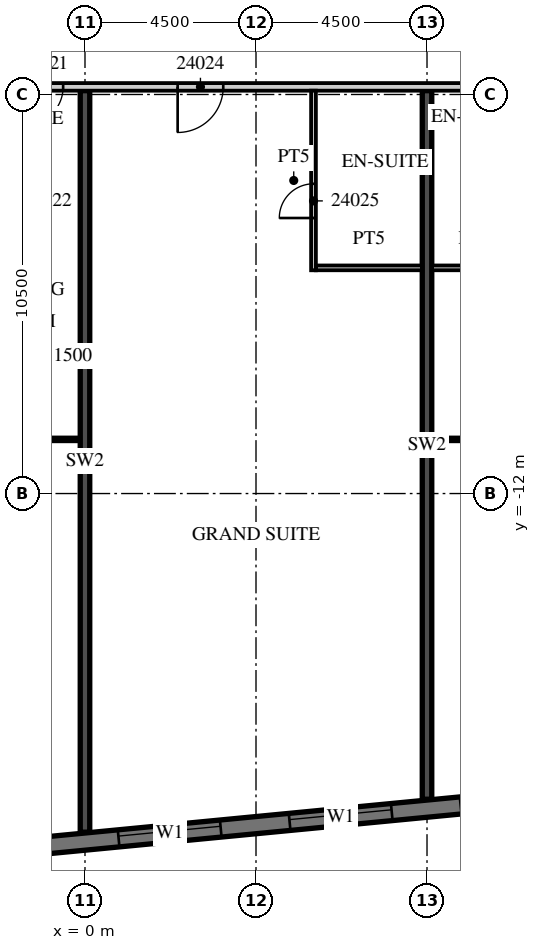
"""IFC4 building model, lengths in metres.
Left out: names, types, materials, properties, quantities, classifications, styles, units other than length and angle.
Written with IfcOpenShell. Run it as: python <this file> out.ifc"""

import sys

from ifc_helpers import new_model, si_unit, direction, frame, frame_2d, origin, place, context, subcontext, project, spatial, rectangle, extrude, element, fill, save


model = new_model("IFC4")
c1 = context("Model", 3, precision=1e-05, world=origin(), true_north=direction((0.0, 1.0)))
c2 = subcontext(c1, "Body", "Model", "MODEL_VIEW")
j1 = project(units=[si_unit("LENGTHUNIT", "METRE"), si_unit("PLANEANGLEUNIT", "RADIAN")], contexts=[c1])
p1 = place(None, origin())
s1 = spatial("IfcSite", under=j1, at=p1, CompositionType="ELEMENT")
p2 = place(p1, origin())
s2 = spatial("IfcBuilding", under=s1, at=p2, CompositionType="ELEMENT")
p3 = place(p2, frame((0.0, 0.0, 114.1)))
s3 = spatial("IfcBuildingStorey", under=s2, at=p3, CompositionType="ELEMENT", Elevation=114.1)
p4 = place(p3, frame((0.0, -20.91, 0.0), z_axis=(0.0, 0.0, 1.0), x_axis=(0.0, 1.0, 0.0)))
e1 = element("IfcWall", 1, at=p4, inside=s3, PredefinedType="SHEAR", context=c2, shape_type="SweptSolid", body=[
    extrude(rectangle(XDim=19.51, YDim=0.25, at=frame_2d((9.755, 0.0))), origin(), (0.0, 0.0, 1.0), 3.3),
])
p5 = place(p3, frame((9.0, -20.044, 0.0), z_axis=(0.0, 0.0, 1.0), x_axis=(0.0, 1.0, 0.0)))
e2 = element("IfcWall", 2, at=p5, inside=s3, PredefinedType="SHEAR", context=c2, shape_type="SweptSolid", body=[
    extrude(rectangle(XDim=18.644, YDim=0.25, at=frame_2d((9.322, 0.0))), origin(), (0.0, 0.0, 1.0), 3.3),
])
p6 = place(p3, frame((-13.521, -22.46, 0.0), z_axis=(0.0, 0.0, 1.0), x_axis=(0.995396096335, 0.095846812164, 0.0)))
e3 = element("IfcWall", 3, at=p6, inside=s3, PredefinedType="SOLIDWALL", context=c2, shape_type="SweptSolid", body=[
    extrude(rectangle(XDim=59.151, YDim=0.45, at=frame_2d((29.575, 0.0))), origin(), (0.0, 0.0, 1.0), 3.02),
])
p7 = place(p6, frame((0.91, 0.0, 0.45)))
e4 = element("IfcOpeningElement", 4, at=p7, cuts=e3, PredefinedType="OPENING", context=c2, shape_type="SweptSolid", body=[
    extrude(rectangle(XDim=2.7, YDim=2.25, at=frame_2d((1.35, 1.125))), frame((0.0, 0.235, 0.0), z_axis=(0.0, -1.0, 0.0), x_axis=(1.0, 0.0, 0.0)), (0.0, 0.0, 1.0), 0.47),
])
p8 = place(p6, frame((5.431, 0.0, 0.45)))
e5 = element("IfcOpeningElement", 5, at=p8, cuts=e3, PredefinedType="OPENING", context=c2, shape_type="SweptSolid", body=[
    extrude(rectangle(XDim=2.7, YDim=2.25, at=frame_2d((1.35, 1.125))), frame((0.0, 0.235, 0.0), z_axis=(0.0, -1.0, 0.0), x_axis=(1.0, 0.0, 0.0)), (0.0, 0.0, 1.0), 0.47),
])
p9 = place(p6, frame((9.952, 0.0, 0.45)))
e6 = element("IfcOpeningElement", 6, at=p9, cuts=e3, PredefinedType="OPENING", context=c2, shape_type="SweptSolid", body=[
    extrude(rectangle(XDim=2.7, YDim=2.25, at=frame_2d((1.35, 1.125))), frame((0.0, 0.235, 0.0), z_axis=(0.0, -1.0, 0.0), x_axis=(1.0, 0.0, 0.0)), (0.0, 0.0, 1.0), 0.47),
])
p10 = place(p6, frame((14.473, 0.0, 0.45)))
e7 = element("IfcOpeningElement", 7, at=p10, cuts=e3, PredefinedType="OPENING", context=c2, shape_type="SweptSolid", body=[
    extrude(rectangle(XDim=2.7, YDim=2.25, at=frame_2d((1.35, 1.125))), frame((0.0, 0.235, 0.0), z_axis=(0.0, -1.0, 0.0), x_axis=(1.0, 0.0, 0.0)), (0.0, 0.0, 1.0), 0.47),
])
p11 = place(p6, frame((18.994, 0.0, 0.45)))
e8 = element("IfcOpeningElement", 8, at=p11, cuts=e3, PredefinedType="OPENING", context=c2, shape_type="SweptSolid", body=[
    extrude(rectangle(XDim=2.7, YDim=2.25, at=frame_2d((1.35, 1.125))), frame((0.0, 0.235, 0.0), z_axis=(0.0, -1.0, 0.0), x_axis=(1.0, 0.0, 0.0)), (0.0, 0.0, 1.0), 0.47),
])
p12 = place(p6, frame((23.514, 0.0, 0.45)))
e9 = element("IfcOpeningElement", 9, at=p12, cuts=e3, PredefinedType="OPENING", context=c2, shape_type="SweptSolid", body=[
    extrude(rectangle(XDim=2.7, YDim=2.25, at=frame_2d((1.35, 1.125))), frame((0.0, 0.235, 0.0), z_axis=(0.0, -1.0, 0.0), x_axis=(1.0, 0.0, 0.0)), (0.0, 0.0, 1.0), 0.47),
])
p13 = place(p6, frame((28.035, 0.0, 0.45)))
e10 = element("IfcOpeningElement", 10, at=p13, cuts=e3, PredefinedType="OPENING", context=c2, shape_type="SweptSolid", body=[
    extrude(rectangle(XDim=2.7, YDim=2.25, at=frame_2d((1.35, 1.125))), frame((0.0, 0.235, 0.0), z_axis=(0.0, -1.0, 0.0), x_axis=(1.0, 0.0, 0.0)), (0.0, 0.0, 1.0), 0.47),
])
p14 = place(p6, frame((32.556, 0.0, 0.45)))
e11 = element("IfcOpeningElement", 11, at=p14, cuts=e3, PredefinedType="OPENING", context=c2, shape_type="SweptSolid", body=[
    extrude(rectangle(XDim=2.7, YDim=2.25, at=frame_2d((1.35, 1.125))), frame((0.0, 0.235, 0.0), z_axis=(0.0, -1.0, 0.0), x_axis=(1.0, 0.0, 0.0)), (0.0, 0.0, 1.0), 0.47),
])
p15 = place(p6, frame((37.077, 0.0, 0.45)))
e12 = element("IfcOpeningElement", 12, at=p15, cuts=e3, PredefinedType="OPENING", context=c2, shape_type="SweptSolid", body=[
    extrude(rectangle(XDim=2.7, YDim=2.25, at=frame_2d((1.35, 1.125))), frame((0.0, 0.235, 0.0), z_axis=(0.0, -1.0, 0.0), x_axis=(1.0, 0.0, 0.0)), (0.0, 0.0, 1.0), 0.47),
])
p16 = place(p6, frame((41.598, 0.0, 0.45)))
e13 = element("IfcOpeningElement", 13, at=p16, cuts=e3, PredefinedType="OPENING", context=c2, shape_type="SweptSolid", body=[
    extrude(rectangle(XDim=2.7, YDim=2.25, at=frame_2d((1.35, 1.125))), frame((0.0, 0.235, 0.0), z_axis=(0.0, -1.0, 0.0), x_axis=(1.0, 0.0, 0.0)), (0.0, 0.0, 1.0), 0.47),
])
p17 = place(p6, frame((46.118, 0.0, 0.45)))
e14 = element("IfcOpeningElement", 14, at=p17, cuts=e3, PredefinedType="OPENING", context=c2, shape_type="SweptSolid", body=[
    extrude(rectangle(XDim=2.7, YDim=2.25, at=frame_2d((1.35, 1.125))), frame((0.0, 0.235, 0.0), z_axis=(0.0, -1.0, 0.0), x_axis=(1.0, 0.0, 0.0)), (0.0, 0.0, 1.0), 0.47),
])
p18 = place(p6, frame((50.639, 0.0, 0.45)))
e15 = element("IfcOpeningElement", 15, at=p18, cuts=e3, PredefinedType="OPENING", context=c2, shape_type="SweptSolid", body=[
    extrude(rectangle(XDim=2.7, YDim=2.25, at=frame_2d((1.35, 1.125))), frame((0.0, 0.235, 0.0), z_axis=(0.0, -1.0, 0.0), x_axis=(1.0, 0.0, 0.0)), (0.0, 0.0, 1.0), 0.47),
])
p19 = place(p6, frame((55.15, 0.0, 0.45)))
e16 = element("IfcOpeningElement", 16, at=p19, cuts=e3, PredefinedType="OPENING", context=c2, shape_type="SweptSolid", body=[
    extrude(rectangle(XDim=2.7, YDim=2.25, at=frame_2d((1.35, 1.125))), frame((0.0, 0.235, 0.0), z_axis=(0.0, -1.0, 0.0), x_axis=(1.0, 0.0, 0.0)), (0.0, 0.0, 1.0), 0.47),
])
p20 = place(p3, frame((-13.5, -1.3, 0.0), z_axis=(0.0, 0.0, 1.0), x_axis=(1.0, 0.0, 0.0)))
e17 = element("IfcWall", 17, at=p20, inside=s3, PredefinedType="PARTITIONING", context=c2, shape_type="SweptSolid", body=[
    extrude(rectangle(XDim=60.932, YDim=0.2, at=frame_2d((30.466, 0.0))), origin(), (0.0, 0.0, 1.0), 3.02),
])
p21 = place(p20, frame((0.575, 0.0, 0.0)))
e18 = element("IfcOpeningElement", 18, at=p21, cuts=e17, PredefinedType="OPENING", context=c2, shape_type="SweptSolid", body=[
    extrude(rectangle(XDim=1.0, YDim=2.1, at=frame_2d((0.5, 1.05))), frame((0.0, 0.11, 0.0), z_axis=(0.0, -1.0, 0.0), x_axis=(1.0, 0.0, 0.0)), (0.0, 0.0, 1.0), 0.22),
])
p22 = place(p20, frame((5.075, 0.0, 0.0)))
e19 = element("IfcOpeningElement", 19, at=p22, cuts=e17, PredefinedType="OPENING", context=c2, shape_type="SweptSolid", body=[
    extrude(rectangle(XDim=1.0, YDim=2.1, at=frame_2d((0.5, 1.05))), frame((0.0, 0.11, 0.0), z_axis=(0.0, -1.0, 0.0), x_axis=(1.0, 0.0, 0.0)), (0.0, 0.0, 1.0), 0.22),
])
p23 = place(p20, frame((11.925, 0.0, 0.0)))
e20 = element("IfcOpeningElement", 20, at=p23, cuts=e17, PredefinedType="OPENING", context=c2, shape_type="SweptSolid", body=[
    extrude(rectangle(XDim=1.0, YDim=2.1, at=frame_2d((0.5, 1.05))), frame((0.0, 0.11, 0.0), z_axis=(0.0, -1.0, 0.0), x_axis=(1.0, 0.0, 0.0)), (0.0, 0.0, 1.0), 0.22),
])
p24 = place(p20, frame((15.938, 0.0, 0.0)))
e21 = element("IfcOpeningElement", 21, at=p24, cuts=e17, PredefinedType="OPENING", context=c2, shape_type="SweptSolid", body=[
    extrude(rectangle(XDim=1.2, YDim=2.1, at=frame_2d((0.6, 1.05))), frame((0.0, 0.11, 0.0), z_axis=(0.0, -1.0, 0.0), x_axis=(1.0, 0.0, 0.0)), (0.0, 0.0, 1.0), 0.22),
])
p25 = place(p20, frame((25.45, 0.0, 0.0)))
e22 = element("IfcOpeningElement", 22, at=p25, cuts=e17, PredefinedType="OPENING", context=c2, shape_type="SweptSolid", body=[
    extrude(rectangle(XDim=1.0, YDim=2.1, at=frame_2d((0.5, 1.05))), frame((0.0, 0.11, 0.0), z_axis=(0.0, -1.0, 0.0), x_axis=(1.0, 0.0, 0.0)), (0.0, 0.0, 1.0), 0.22),
])
p26 = place(p20, frame((27.55, 0.0, 0.0)))
e23 = element("IfcOpeningElement", 23, at=p26, cuts=e17, PredefinedType="OPENING", context=c2, shape_type="SweptSolid", body=[
    extrude(rectangle(XDim=1.0, YDim=2.1, at=frame_2d((0.5, 1.05))), frame((0.0, 0.11, 0.0), z_axis=(0.0, -1.0, 0.0), x_axis=(1.0, 0.0, 0.0)), (0.0, 0.0, 1.0), 0.22),
])
p27 = place(p20, frame((33.938, 0.0, 0.0)))
e24 = element("IfcOpeningElement", 24, at=p27, cuts=e17, PredefinedType="OPENING", context=c2, shape_type="SweptSolid", body=[
    extrude(rectangle(XDim=1.2, YDim=2.1, at=frame_2d((0.6, 1.05))), frame((0.0, 0.11, 0.0), z_axis=(0.0, -1.0, 0.0), x_axis=(1.0, 0.0, 0.0)), (0.0, 0.0, 1.0), 0.22),
])
p28 = place(p20, frame((45.862, 0.0, 0.0)))
e25 = element("IfcOpeningElement", 25, at=p28, cuts=e17, PredefinedType="OPENING", context=c2, shape_type="SweptSolid", body=[
    extrude(rectangle(XDim=1.2, YDim=2.1, at=frame_2d((0.6, 1.05))), frame((0.0, 0.11, 0.0), z_axis=(0.0, -1.0, 0.0), x_axis=(1.0, 0.0, 0.0)), (0.0, 0.0, 1.0), 0.22),
])
p29 = place(p20, frame((52.425, 0.0, 0.0)))
e26 = element("IfcOpeningElement", 26, at=p29, cuts=e17, PredefinedType="OPENING", context=c2, shape_type="SweptSolid", body=[
    extrude(rectangle(XDim=1.0, YDim=2.1, at=frame_2d((0.5, 1.05))), frame((0.0, 0.11, 0.0), z_axis=(0.0, -1.0, 0.0), x_axis=(1.0, 0.0, 0.0)), (0.0, 0.0, 1.0), 0.22),
])
p30 = place(p20, frame((56.95, 0.0, 0.0)))
e27 = element("IfcOpeningElement", 27, at=p30, cuts=e17, PredefinedType="OPENING", context=c2, shape_type="SweptSolid", body=[
    extrude(rectangle(XDim=1.0, YDim=2.1, at=frame_2d((0.5, 1.05))), frame((0.0, 0.11, 0.0), z_axis=(0.0, -1.0, 0.0), x_axis=(1.0, 0.0, 0.0)), (0.0, 0.0, 1.0), 0.22),
])
p31 = place(p20, frame((59.882, 0.0, 0.0)))
e28 = element("IfcOpeningElement", 28, at=p31, cuts=e17, PredefinedType="OPENING", context=c2, shape_type="SweptSolid", body=[
    extrude(rectangle(XDim=0.9, YDim=2.1, at=frame_2d((0.45, 1.05))), frame((0.0, 0.11, 0.0), z_axis=(0.0, -1.0, 0.0), x_axis=(1.0, 0.0, 0.0)), (0.0, 0.0, 1.0), 0.22),
])
p32 = place(p3, frame((-4.4, -10.575, 0.0), z_axis=(0.0, 0.0, 1.0), x_axis=(1.0, 0.0, 0.0)))
e29 = element("IfcWall", 29, at=p32, inside=s3, PredefinedType="PARTITIONING", context=c2, shape_type="SweptSolid", body=[
    extrude(rectangle(XDim=4.275, YDim=0.1, at=frame_2d((2.137, 0.0))), origin(), (0.0, 0.0, 1.0), 3.02),
])
p33 = place(p32, frame((1.988, 0.0, 0.0)))
e30 = element("IfcOpeningElement", 30, at=p33, cuts=e29, PredefinedType="OPENING", context=c2, shape_type="SweptSolid", body=[
    extrude(rectangle(XDim=1.5, YDim=2.1, at=frame_2d((0.75, 1.05))), frame((0.0, 0.06, 0.0), z_axis=(0.0, -1.0, 0.0), x_axis=(1.0, 0.0, 0.0)), (0.0, 0.0, 1.0), 0.12),
])
p34 = place(p3, frame((6.013, -6.125, 0.0), z_axis=(0.0, 0.0, 1.0), x_axis=(0.0, 1.0, 0.0)))
e31 = element("IfcWall", 31, at=p34, inside=s3, PredefinedType="PARTITIONING", context=c2, shape_type="SweptSolid", body=[
    extrude(rectangle(XDim=4.725, YDim=0.125, at=frame_2d((2.363, 0.0))), origin(), (0.0, 0.0, 1.0), 3.02),
])
p35 = place(p34, frame((1.375, 0.0, 0.0)))
e32 = element("IfcOpeningElement", 32, at=p35, cuts=e31, PredefinedType="OPENING", context=c2, shape_type="SweptSolid", body=[
    extrude(rectangle(XDim=0.9, YDim=2.1, at=frame_2d((0.45, 1.05))), frame((0.0, 0.073, 0.0), z_axis=(0.0, -1.0, 0.0), x_axis=(1.0, 0.0, 0.0)), (0.0, 0.0, 1.0), 0.145),
])
p36 = place(p3, frame((6.075, -6.062, 0.0), z_axis=(0.0, 0.0, 1.0), x_axis=(1.0, 0.0, 0.0)))
e33 = element("IfcWall", 33, at=p36, inside=s3, PredefinedType="PARTITIONING", context=c2, shape_type="SweptSolid", body=[
    extrude(rectangle(XDim=2.8, YDim=0.125, at=frame_2d((1.4, 0.0))), origin(), (0.0, 0.0, 1.0), 3.02),
])
p37 = place(p3, frame((9.125, -6.062, 0.0), z_axis=(0.0, 0.0, 1.0), x_axis=(1.0, 0.0, 0.0)))
e34 = element("IfcWall", 34, at=p37, inside=s3, PredefinedType="PARTITIONING", context=c2, shape_type="SweptSolid", body=[
    extrude(rectangle(XDim=2.25, YDim=0.125, at=frame_2d((1.125, 0.0))), origin(), (0.0, 0.0, 1.0), 3.02),
])
p38 = place(p3, frame((9.125, -10.575, 0.0), z_axis=(0.0, 0.0, 1.0), x_axis=(1.0, 0.0, 0.0)))
e35 = element("IfcWall", 35, at=p38, inside=s3, PredefinedType="PARTITIONING", context=c2, shape_type="SweptSolid", body=[
    extrude(rectangle(XDim=4.275, YDim=0.1, at=frame_2d((2.137, 0.0))), origin(), (0.0, 0.0, 1.0), 3.02),
])
p39 = place(p38, frame((1.987, 0.0, 0.0)))
e36 = element("IfcOpeningElement", 36, at=p39, cuts=e35, PredefinedType="OPENING", context=c2, shape_type="SweptSolid", body=[
    extrude(rectangle(XDim=1.5, YDim=2.1, at=frame_2d((0.75, 1.05))), frame((0.0, 0.06, 0.0), z_axis=(0.0, -1.0, 0.0), x_axis=(1.0, 0.0, 0.0)), (0.0, 0.0, 1.0), 0.12),
])
p40 = place(p10, origin())
e37 = element("IfcWindow", 37, at=p40, inside=s3, PartitioningType="SINGLE_PANEL", PredefinedType="WINDOW", context=c2, shape_type="SweptSolid", body=[
    extrude(rectangle(XDim=2.7, YDim=2.25, at=frame_2d((1.35, 1.125))), frame((0.0, 0.09, 0.0), z_axis=(0.0, -1.0, 0.0), x_axis=(1.0, 0.0, 0.0)), (0.0, 0.0, 1.0), 0.06),
])
fill(e7, e37)
p41 = place(p11, origin())
e38 = element("IfcWindow", 38, at=p41, inside=s3, PartitioningType="SINGLE_PANEL", PredefinedType="WINDOW", context=c2, shape_type="SweptSolid", body=[
    extrude(rectangle(XDim=2.7, YDim=2.25, at=frame_2d((1.35, 1.125))), frame((0.0, 0.09, 0.0), z_axis=(0.0, -1.0, 0.0), x_axis=(1.0, 0.0, 0.0)), (0.0, 0.0, 1.0), 0.06),
])
fill(e8, e38)
p42 = place(p23, origin())
e39 = element("IfcDoor", 39, at=p42, inside=s3, OperationType="SINGLE_SWING_LEFT", PredefinedType="DOOR", context=c2, shape_type="SweptSolid", body=[
    extrude(rectangle(XDim=1.0, YDim=2.1, at=frame_2d((0.5, 1.05))), frame((0.0, 0.025, 0.0), z_axis=(0.0, -1.0, 0.0), x_axis=(1.0, 0.0, 0.0)), (0.0, 0.0, 1.0), 0.05),
])
fill(e20, e39)
p43 = place(p24, origin())
e40 = element("IfcDoor", 40, at=p43, inside=s3, OperationType="SINGLE_SWING_LEFT", PredefinedType="DOOR", context=c2, shape_type="SweptSolid", body=[
    extrude(rectangle(XDim=1.2, YDim=2.1, at=frame_2d((0.6, 1.05))), frame((0.0, 0.025, 0.0), z_axis=(0.0, -1.0, 0.0), x_axis=(1.0, 0.0, 0.0)), (0.0, 0.0, 1.0), 0.05),
])
fill(e21, e40)
p44 = place(p35, origin())
e41 = element("IfcDoor", 41, at=p44, inside=s3, OperationType="SINGLE_SWING_LEFT", PredefinedType="DOOR", context=c2, shape_type="SweptSolid", body=[
    extrude(rectangle(XDim=0.9, YDim=2.1, at=frame_2d((0.45, 1.05))), frame((0.0, 0.025, 0.0), z_axis=(0.0, -1.0, 0.0), x_axis=(1.0, 0.0, 0.0)), (0.0, 0.0, 1.0), 0.05),
])
fill(e32, e41)
save(model, sys.argv[1])
